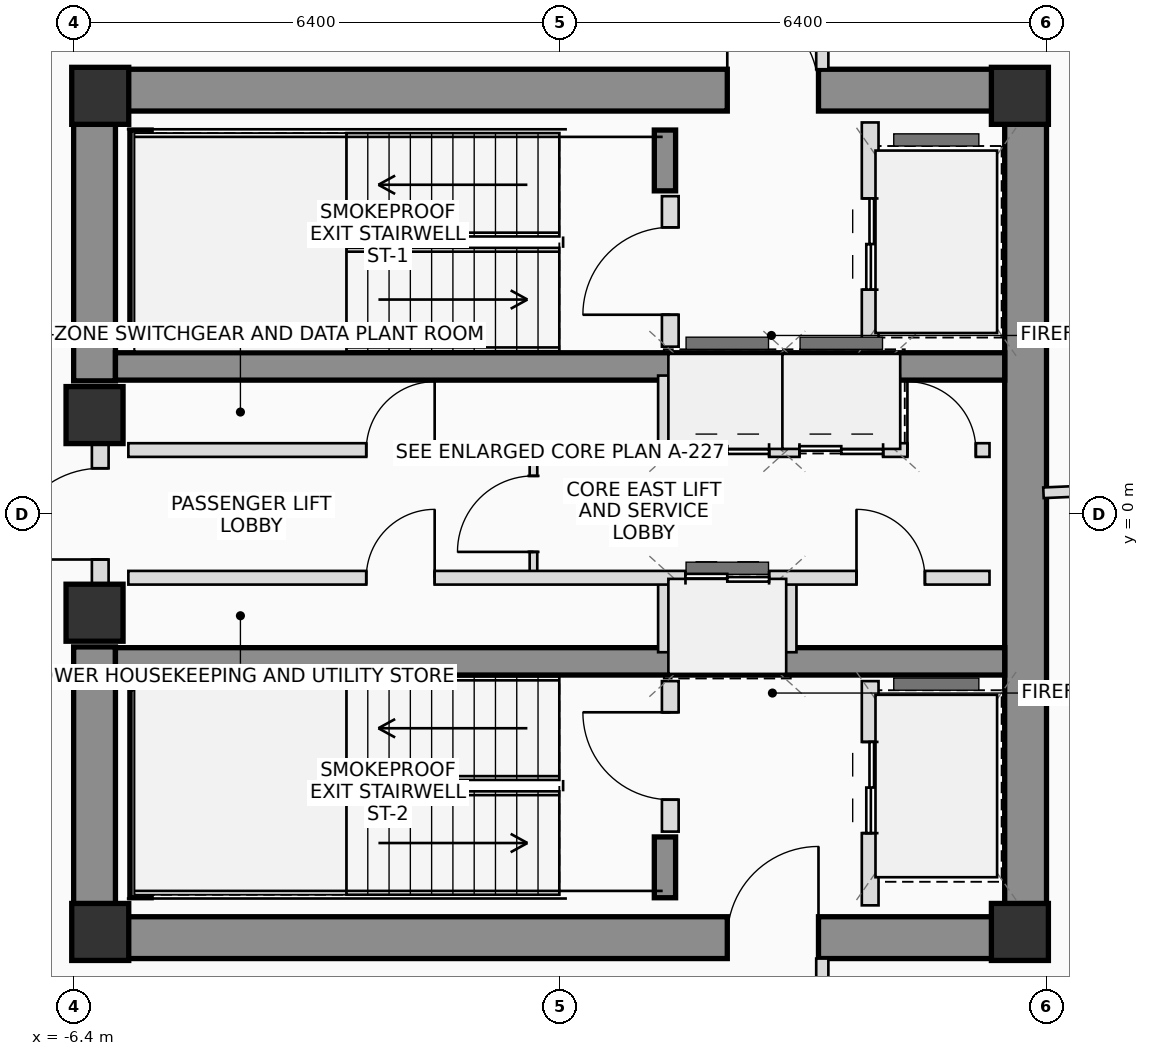
"""IFC4 building model, lengths in metres.
Left out: names, types, materials, properties, quantities, classifications, styles, units other than length and angle.
Written with IfcOpenShell. Run it as: python <this file> out.ifc"""

import sys

from ifc_helpers import new_model, si_unit, direction, frame, frame_2d, origin, origin_2d, place, context, subcontext, project, spatial, rectangle, extrude, source, transform, mapped, element, fill, save


model = new_model("IFC4")
c1 = context("Model", 3, precision=1e-05, world=origin(), true_north=direction((0.0, 1.0)))
c2 = subcontext(c1, "Body", "Model", "MODEL_VIEW")
j1 = project(units=[si_unit("LENGTHUNIT", "METRE"), si_unit("PLANEANGLEUNIT", "RADIAN")], contexts=[c1])
p1 = place(None, origin())
s1 = spatial("IfcSite", under=j1, at=p1, CompositionType="ELEMENT")
p2 = place(p1, origin())
s2 = spatial("IfcBuilding", under=s1, at=p2, CompositionType="ELEMENT")
p3 = place(p2, frame((0.0, 0.0, 307.1)))
s3 = spatial("IfcBuildingStorey", under=s2, at=p3, CompositionType="ELEMENT", Elevation=307.1)
m1 = source(origin(), c2, "Body", "SweptSolid", [
    extrude(rectangle(XDim=0.75, YDim=0.75, at=origin_2d()), origin(), (0.0, 0.0, 1.0), 3.45),
])
for number, where, z_axis, x_axis in (
    (1, (-6.05, -5.5, 0.0), (0.0, 0.0, 1.0), (1.0, 0.0, 0.0)),
    (2, (6.05, -5.5, 0.0), (0.0, 0.0, 1.0), (1.0, 0.0, 0.0)),
    (3, (6.05, 5.5, 0.0), (0.0, 0.0, 1.0), (1.0, 0.0, 0.0)),
    (4, (-6.05, 5.5, 0.0), (0.0, 0.0, 1.0), (1.0, 0.0, 0.0)),
):
    element("IfcColumn", number, at=place(p3, frame(where, z_axis=z_axis, x_axis=x_axis)), inside=s3, PredefinedType="COLUMN", context=c2, shape_type="MappedRepresentation", body=[
        mapped(m1, transform((0.0, 0.0, 0.0), scale=1.0)),
    ])
p4 = place(p3, frame((-6.4, 5.575, 0.0), z_axis=(0.0, 0.0, 1.0), x_axis=(1.0, 0.0, 0.0)))
e5 = element("IfcWall", 5, at=p4, inside=s3, PredefinedType="SHEAR", context=c2, shape_type="SweptSolid", body=[
    extrude(rectangle(XDim=12.8, YDim=0.55, at=frame_2d((6.4, 0.0))), origin(), (0.0, 0.0, 1.0), 3.45),
])
p5 = place(p4, frame((8.6, 0.0, 0.0)))
e6 = element("IfcOpeningElement", 6, at=p5, cuts=e5, PredefinedType="OPENING", context=c2, shape_type="SweptSolid", body=[
    extrude(rectangle(XDim=1.2, YDim=2.2, at=frame_2d((0.6, 1.1))), frame((0.0, 0.285, 0.0), z_axis=(0.0, -1.0, 0.0), x_axis=(1.0, 0.0, 0.0)), (0.0, 0.0, 1.0), 0.57),
])
p6 = place(p3, frame((-6.4, -5.575, 0.0), z_axis=(0.0, 0.0, 1.0), x_axis=(1.0, 0.0, 0.0)))
e7 = element("IfcWall", 7, at=p6, inside=s3, PredefinedType="SHEAR", context=c2, shape_type="SweptSolid", body=[
    extrude(rectangle(XDim=12.8, YDim=0.55, at=frame_2d((6.4, 0.0))), origin(), (0.0, 0.0, 1.0), 3.45),
])
p7 = place(p6, frame((8.6, 0.0, 0.0)))
e8 = element("IfcOpeningElement", 8, at=p7, cuts=e7, PredefinedType="OPENING", context=c2, shape_type="SweptSolid", body=[
    extrude(rectangle(XDim=1.2, YDim=2.2, at=frame_2d((0.6, 1.1))), frame((0.0, 0.285, 0.0), z_axis=(0.0, -1.0, 0.0), x_axis=(1.0, 0.0, 0.0)), (0.0, 0.0, 1.0), 0.57),
])
p8 = place(p3, frame((6.125, -5.3, 0.0), z_axis=(0.0, 0.0, 1.0), x_axis=(0.0, 1.0, 0.0)))
e9 = element("IfcWall", 9, at=p8, inside=s3, PredefinedType="SHEAR", context=c2, shape_type="SweptSolid", body=[
    extrude(rectangle(XDim=10.6, YDim=0.55, at=frame_2d((5.3, 0.0))), origin(), (0.0, 0.0, 1.0), 3.45),
])
for number, where, z_axis, x_axis in (
    (10, (-6.125, -5.3, 0.0), (0.0, 0.0, 1.0), (0.0, 1.0, 0.0)),
    (11, (-6.125, 1.75, 0.0), (0.0, 0.0, 1.0), (0.0, 1.0, 0.0)),
):
    element("IfcWall", number, at=place(p3, frame(where, z_axis=z_axis, x_axis=x_axis)), inside=s3, PredefinedType="SHEAR", context=c2, shape_type="SweptSolid", body=[
        extrude(rectangle(XDim=3.55, YDim=0.55, at=frame_2d((1.775, 0.0))), origin(), (0.0, 0.0, 1.0), 3.45),
    ])
for number, where, z_axis, x_axis in (
    (12, (-5.85, 1.94, 0.0), (0.0, 0.0, 1.0), (1.0, 0.0, 0.0)),
    (13, (-5.85, -1.94, 0.0), (0.0, 0.0, 1.0), (1.0, 0.0, 0.0)),
):
    element("IfcWall", number, at=place(p3, frame(where, z_axis=z_axis, x_axis=x_axis)), inside=s3, PredefinedType="SHEAR", context=c2, shape_type="SweptSolid", body=[
        extrude(rectangle(XDim=11.7, YDim=0.36, at=frame_2d((5.85, 0.0))), origin(), (0.0, 0.0, 1.0), 3.45),
    ])
p9 = place(p3, frame((-5.52, 2.3, 0.0), z_axis=(0.0, 0.0, 1.0), x_axis=(0.0, 1.0, 0.0)))
e14 = element("IfcWall", 14, at=p9, inside=s3, PredefinedType="SHEAR", context=c2, shape_type="SweptSolid", body=[
    extrude(rectangle(XDim=2.75, YDim=0.28, at=frame_2d((1.375, 0.0))), origin(), (0.0, 0.0, 1.0), 3.45),
])
p10 = place(p3, frame((1.38, 4.25, 0.0), z_axis=(0.0, 0.0, 1.0), x_axis=(0.0, 1.0, 0.0)))
e15 = element("IfcWall", 15, at=p10, inside=s3, PredefinedType="SHEAR", context=c2, shape_type="SweptSolid", body=[
    extrude(rectangle(XDim=0.8, YDim=0.28, at=frame_2d((0.4, 0.0))), origin(), (0.0, 0.0, 1.0), 3.45),
])
p11 = place(p3, frame((-5.52, -5.05, 0.0), z_axis=(0.0, 0.0, 1.0), x_axis=(0.0, 1.0, 0.0)))
e16 = element("IfcWall", 16, at=p11, inside=s3, PredefinedType="SHEAR", context=c2, shape_type="SweptSolid", body=[
    extrude(rectangle(XDim=2.75, YDim=0.28, at=frame_2d((1.375, 0.0))), origin(), (0.0, 0.0, 1.0), 3.45),
])
p12 = place(p3, frame((1.38, -5.05, 0.0), z_axis=(0.0, 0.0, 1.0), x_axis=(0.0, 1.0, 0.0)))
e17 = element("IfcWall", 17, at=p12, inside=s3, PredefinedType="SHEAR", context=c2, shape_type="SweptSolid", body=[
    extrude(rectangle(XDim=0.8, YDim=0.28, at=frame_2d((0.4, 0.0))), origin(), (0.0, 0.0, 1.0), 3.45),
])
for number, where, z_axis, x_axis in (
    (18, (-6.125, -1.3, 0.0), (0.0, 0.0, 1.0), (1.0, 0.0, 0.0)),
    (19, (-6.125, 1.3, 0.0), (0.0, 0.0, 1.0), (1.0, 0.0, 0.0)),
):
    element("IfcColumn", number, at=place(p3, frame(where, z_axis=z_axis, x_axis=x_axis)), inside=s3, PredefinedType="COLUMN", context=c2, shape_type="MappedRepresentation", body=[
        mapped(m1, transform((0.0, 0.0, 0.0), scale=1.0)),
    ])
p13 = place(p3, frame((-6.05, -0.95, 0.0), z_axis=(0.0, 0.0, 1.0), x_axis=(0.0, 1.0, 0.0)))
e20 = element("IfcWall", 20, at=p13, inside=s3, PredefinedType="PLUMBINGWALL", context=c2, shape_type="SweptSolid", body=[
    extrude(rectangle(XDim=1.9, YDim=0.22, at=frame_2d((0.95, 0.0))), origin(), (0.0, 0.0, 1.0), 2.23),
])
p14 = place(p13, frame((0.35, 0.0, 0.0)))
e21 = element("IfcOpeningElement", 21, at=p14, cuts=e20, PredefinedType="OPENING", context=c2, shape_type="SweptSolid", body=[
    extrude(rectangle(XDim=1.2, YDim=2.2, at=frame_2d((0.6, 1.1))), frame((0.0, 0.12, 0.0), z_axis=(0.0, -1.0, 0.0), x_axis=(1.0, 0.0, 0.0)), (0.0, 0.0, 1.0), 0.24),
])
p15 = place(p3, frame((1.45, 2.2, 0.0), z_axis=(0.0, 0.0, 1.0), x_axis=(0.0, 1.0, 0.0)))
e22 = element("IfcWall", 22, at=p15, inside=s3, PredefinedType="PLUMBINGWALL", context=c2, shape_type="SweptSolid", body=[
    extrude(rectangle(XDim=1.98, YDim=0.22, at=frame_2d((0.99, 0.0))), origin(), (0.0, 0.0, 1.0), 3.25),
])
p16 = place(p15, frame((0.42, 0.0, 0.0)))
e23 = element("IfcOpeningElement", 23, at=p16, cuts=e22, PredefinedType="OPENING", context=c2, shape_type="SweptSolid", body=[
    extrude(rectangle(XDim=1.15, YDim=2.15, at=frame_2d((0.575, 1.075))), frame((0.0, 0.12, 0.0), z_axis=(0.0, -1.0, 0.0), x_axis=(1.0, 0.0, 0.0)), (0.0, 0.0, 1.0), 0.24),
])
p17 = place(p3, frame((4.08, 2.2, 0.0), z_axis=(0.0, 0.0, 1.0), x_axis=(0.0, 1.0, 0.0)))
e24 = element("IfcWall", 24, at=p17, inside=s3, PredefinedType="PLUMBINGWALL", context=c2, shape_type="SweptSolid", body=[
    extrude(rectangle(XDim=2.95, YDim=0.22, at=frame_2d((1.475, 0.0))), origin(), (0.0, 0.0, 1.0), 3.25),
])
p18 = place(p17, frame((0.75, 0.0, 0.0)))
e25 = element("IfcOpeningElement", 25, at=p18, cuts=e24, PredefinedType="OPENING", context=c2, shape_type="SweptSolid", body=[
    extrude(rectangle(XDim=1.2, YDim=2.25, at=frame_2d((0.6, 1.125))), frame((0.0, 0.12, 0.0), z_axis=(0.0, -1.0, 0.0), x_axis=(1.0, 0.0, 0.0)), (0.0, 0.0, 1.0), 0.24),
])
p19 = place(p3, frame((1.45, -4.18, 0.0), z_axis=(0.0, 0.0, 1.0), x_axis=(0.0, 1.0, 0.0)))
e26 = element("IfcWall", 26, at=p19, inside=s3, PredefinedType="PLUMBINGWALL", context=c2, shape_type="SweptSolid", body=[
    extrude(rectangle(XDim=1.98, YDim=0.22, at=frame_2d((0.99, 0.0))), origin(), (0.0, 0.0, 1.0), 3.25),
])
p20 = place(p19, frame((0.42, 0.0, 0.0)))
e27 = element("IfcOpeningElement", 27, at=p20, cuts=e26, PredefinedType="OPENING", context=c2, shape_type="SweptSolid", body=[
    extrude(rectangle(XDim=1.15, YDim=2.15, at=frame_2d((0.575, 1.075))), frame((0.0, 0.12, 0.0), z_axis=(0.0, -1.0, 0.0), x_axis=(1.0, 0.0, 0.0)), (0.0, 0.0, 1.0), 0.24),
])
p21 = place(p3, frame((4.08, -5.15, 0.0), z_axis=(0.0, 0.0, 1.0), x_axis=(0.0, 1.0, 0.0)))
e28 = element("IfcWall", 28, at=p21, inside=s3, PredefinedType="PLUMBINGWALL", context=c2, shape_type="SweptSolid", body=[
    extrude(rectangle(XDim=2.95, YDim=0.22, at=frame_2d((1.475, 0.0))), origin(), (0.0, 0.0, 1.0), 3.25),
])
p22 = place(p21, frame((0.95, 0.0, 0.0)))
e29 = element("IfcOpeningElement", 29, at=p22, cuts=e28, PredefinedType="OPENING", context=c2, shape_type="SweptSolid", body=[
    extrude(rectangle(XDim=1.2, YDim=2.25, at=frame_2d((0.6, 1.125))), frame((0.0, 0.12, 0.0), z_axis=(0.0, -1.0, 0.0), x_axis=(1.0, 0.0, 0.0)), (0.0, 0.0, 1.0), 0.24),
])
p23 = place(p3, frame((-0.35, -0.84, 0.0), z_axis=(0.0, 0.0, 1.0), x_axis=(0.0, 1.0, 0.0)))
e30 = element("IfcWall", 30, at=p23, inside=s3, PredefinedType="PARTITIONING", context=c2, shape_type="SweptSolid", body=[
    extrude(rectangle(XDim=1.68, YDim=0.1, at=frame_2d((0.84, 0.0))), origin(), (0.0, 0.0, 1.0), 3.25),
])
p24 = place(p23, frame((0.34, 0.0, 0.0)))
e31 = element("IfcOpeningElement", 31, at=p24, cuts=e30, PredefinedType="OPENING", context=c2, shape_type="SweptSolid", body=[
    extrude(rectangle(XDim=1.0, YDim=2.25, at=frame_2d((0.5, 1.125))), frame((0.0, 0.06, 0.0), z_axis=(0.0, -1.0, 0.0), x_axis=(1.0, 0.0, 0.0)), (0.0, 0.0, 1.0), 0.12),
])
for number, where, z_axis, x_axis in (
    (32, (1.38, 0.84, 0.0), (0.0, 0.0, 1.0), (0.0, 1.0, 0.0)),
    (33, (1.38, -1.82, 0.0), (0.0, 0.0, 1.0), (0.0, 1.0, 0.0)),
    (34, (3.02, 0.84, 0.0), (0.0, 0.0, 1.0), (0.0, 1.0, 0.0)),
    (35, (4.38, 0.84, 0.0), (0.0, 0.0, 1.0), (0.0, 1.0, 0.0)),
    (36, (3.02, -1.82, 0.0), (0.0, 0.0, 1.0), (0.0, 1.0, 0.0)),
):
    element("IfcWall", number, at=place(p3, frame(where, z_axis=z_axis, x_axis=x_axis)), inside=s3, PredefinedType="PLUMBINGWALL", context=c2, shape_type="SweptSolid", body=[
        extrude(rectangle(XDim=0.98, YDim=0.18, at=frame_2d((0.49, 0.0))), origin(), (0.0, 0.0, 1.0), 3.25),
    ])
p25 = place(p3, frame((-5.68, 0.84, 0.0), z_axis=(0.0, 0.0, 1.0), x_axis=(1.0, 0.0, 0.0)))
e37 = element("IfcWall", 37, at=p25, inside=s3, PredefinedType="PLUMBINGWALL", context=c2, shape_type="SweptSolid", body=[
    extrude(rectangle(XDim=11.33, YDim=0.18, at=frame_2d((5.665, 0.0))), origin(), (0.0, 0.0, 1.0), 3.25),
])
p26 = place(p25, frame((3.13, 0.0, 0.0)))
e38 = element("IfcOpeningElement", 38, at=p26, cuts=e37, PredefinedType="OPENING", context=c2, shape_type="SweptSolid", body=[
    extrude(rectangle(XDim=0.9, YDim=2.05, at=frame_2d((0.45, 1.025))), frame((0.0, 0.1, 0.0), z_axis=(0.0, -1.0, 0.0), x_axis=(1.0, 0.0, 0.0)), (0.0, 0.0, 1.0), 0.2),
])
p27 = place(p25, frame((7.33, 0.0, 0.0)))
e39 = element("IfcOpeningElement", 39, at=p27, cuts=e37, PredefinedType="OPENING", context=c2, shape_type="SweptSolid", body=[
    extrude(rectangle(XDim=1.1, YDim=2.2, at=frame_2d((0.55, 1.1))), frame((0.0, 0.1, 0.0), z_axis=(0.0, -1.0, 0.0), x_axis=(1.0, 0.0, 0.0)), (0.0, 0.0, 1.0), 0.2),
])
p28 = place(p25, frame((8.83, 0.0, 0.0)))
e40 = element("IfcOpeningElement", 40, at=p28, cuts=e37, PredefinedType="OPENING", context=c2, shape_type="SweptSolid", body=[
    extrude(rectangle(XDim=1.1, YDim=2.2, at=frame_2d((0.55, 1.1))), frame((0.0, 0.1, 0.0), z_axis=(0.0, -1.0, 0.0), x_axis=(1.0, 0.0, 0.0)), (0.0, 0.0, 1.0), 0.2),
])
p29 = place(p25, frame((10.25, 0.0, 0.0)))
e41 = element("IfcOpeningElement", 41, at=p29, cuts=e37, PredefinedType="OPENING", context=c2, shape_type="SweptSolid", body=[
    extrude(rectangle(XDim=0.9, YDim=2.05, at=frame_2d((0.45, 1.025))), frame((0.0, 0.1, 0.0), z_axis=(0.0, -1.0, 0.0), x_axis=(1.0, 0.0, 0.0)), (0.0, 0.0, 1.0), 0.2),
])
p30 = place(p3, frame((-5.68, -0.84, 0.0), z_axis=(0.0, 0.0, 1.0), x_axis=(1.0, 0.0, 0.0)))
e42 = element("IfcWall", 42, at=p30, inside=s3, PredefinedType="PLUMBINGWALL", context=c2, shape_type="SweptSolid", body=[
    extrude(rectangle(XDim=11.33, YDim=0.18, at=frame_2d((5.665, 0.0))), origin(), (0.0, 0.0, 1.0), 3.25),
])
p31 = place(p30, frame((3.13, 0.0, 0.0)))
e43 = element("IfcOpeningElement", 43, at=p31, cuts=e42, PredefinedType="OPENING", context=c2, shape_type="SweptSolid", body=[
    extrude(rectangle(XDim=0.9, YDim=2.05, at=frame_2d((0.45, 1.025))), frame((0.0, 0.1, 0.0), z_axis=(0.0, -1.0, 0.0), x_axis=(1.0, 0.0, 0.0)), (0.0, 0.0, 1.0), 0.2),
])
p32 = place(p30, frame((7.33, 0.0, 0.0)))
e44 = element("IfcOpeningElement", 44, at=p32, cuts=e42, PredefinedType="OPENING", context=c2, shape_type="SweptSolid", body=[
    extrude(rectangle(XDim=1.1, YDim=2.2, at=frame_2d((0.55, 1.1))), frame((0.0, 0.1, 0.0), z_axis=(0.0, -1.0, 0.0), x_axis=(1.0, 0.0, 0.0)), (0.0, 0.0, 1.0), 0.2),
])
p33 = place(p30, frame((9.58, 0.0, 0.0)))
e45 = element("IfcOpeningElement", 45, at=p33, cuts=e42, PredefinedType="OPENING", context=c2, shape_type="SweptSolid", body=[
    extrude(rectangle(XDim=0.9, YDim=2.05, at=frame_2d((0.45, 1.025))), frame((0.0, 0.1, 0.0), z_axis=(0.0, -1.0, 0.0), x_axis=(1.0, 0.0, 0.0)), (0.0, 0.0, 1.0), 0.2),
])
p34 = place(p3, frame((3.45, 7.425, 0.0), z_axis=(0.0, 0.0, 1.0), x_axis=(0.0, -1.0, 0.0)))
e46 = element("IfcWall", 46, at=p34, inside=s3, PredefinedType="PARTITIONING", context=c2, shape_type="SweptSolid", body=[
    extrude(rectangle(XDim=1.575, YDim=0.16, at=frame_2d((0.787, 0.0))), origin(), (0.0, 0.0, 1.0), 2.855),
])
p35 = place(p34, frame((0.287, 0.0, 0.0)))
e47 = element("IfcOpeningElement", 47, at=p35, cuts=e46, PredefinedType="OPENING", context=c2, shape_type="SweptSolid", body=[
    extrude(rectangle(XDim=1.0, YDim=2.25, at=frame_2d((0.5, 1.125))), frame((0.0, 0.09, 0.0), z_axis=(0.0, -1.0, 0.0), x_axis=(1.0, 0.0, 0.0)), (0.0, 0.0, 1.0), 0.18),
])
p36 = place(p3, frame((3.45, -5.85, 0.0), z_axis=(0.0, 0.0, 1.0), x_axis=(0.0, -1.0, 0.0)))
e48 = element("IfcWall", 48, at=p36, inside=s3, PredefinedType="PARTITIONING", context=c2, shape_type="SweptSolid", body=[
    extrude(rectangle(XDim=1.575, YDim=0.16, at=frame_2d((0.787, 0.0))), origin(), (0.0, 0.0, 1.0), 2.855),
])
p37 = place(p36, frame((0.287, 0.0, 0.0)))
e49 = element("IfcOpeningElement", 49, at=p37, cuts=e48, PredefinedType="OPENING", context=c2, shape_type="SweptSolid", body=[
    extrude(rectangle(XDim=1.0, YDim=2.25, at=frame_2d((0.5, 1.125))), frame((0.0, 0.09, 0.0), z_axis=(0.0, -1.0, 0.0), x_axis=(1.0, 0.0, 0.0)), (0.0, 0.0, 1.0), 0.18),
])
p38 = place(p3, frame((6.36, 0.278, 0.0), z_axis=(0.0, 0.0, 1.0), x_axis=(0.999047623791, 0.043633076864, 0.0)))
e50 = element("IfcWall", 50, at=p38, inside=s3, PredefinedType="PARTITIONING", context=c2, shape_type="SweptSolid", body=[
    extrude(rectangle(XDim=13.524, YDim=0.14, at=frame_2d((6.762, 0.0))), origin(), (0.0, 0.0, 1.0), 2.815),
])
p39 = place(p5, origin())
e51 = element("IfcDoor", 51, at=p39, inside=s3, OperationType="SINGLE_SWING_LEFT", PredefinedType="DOOR", context=c2, shape_type="SweptSolid", body=[
    extrude(rectangle(XDim=1.2, YDim=2.2, at=frame_2d((0.6, 1.1))), frame((0.0, 0.025, 0.0), z_axis=(0.0, -1.0, 0.0), x_axis=(1.0, 0.0, 0.0)), (0.0, 0.0, 1.0), 0.05),
])
fill(e6, e51)
p40 = place(p7, origin())
e52 = element("IfcDoor", 52, at=p40, inside=s3, OperationType="SINGLE_SWING_RIGHT", PredefinedType="DOOR", context=c2, shape_type="SweptSolid", body=[
    extrude(rectangle(XDim=1.2, YDim=2.2, at=frame_2d((0.6, 1.1))), frame((0.0, 0.025, 0.0), z_axis=(0.0, -1.0, 0.0), x_axis=(1.0, 0.0, 0.0)), (0.0, 0.0, 1.0), 0.05),
])
fill(e8, e52)
p41 = place(p14, origin())
e53 = element("IfcDoor", 53, at=p41, inside=s3, OperationType="SINGLE_SWING_LEFT", PredefinedType="DOOR", context=c2, shape_type="SweptSolid", body=[
    extrude(rectangle(XDim=1.2, YDim=2.2, at=frame_2d((0.6, 1.1))), frame((0.0, 0.025, 0.0), z_axis=(0.0, -1.0, 0.0), x_axis=(1.0, 0.0, 0.0)), (0.0, 0.0, 1.0), 0.05),
])
fill(e21, e53)
p42 = place(p16, origin())
e54 = element("IfcDoor", 54, at=p42, inside=s3, OperationType="SINGLE_SWING_LEFT", PredefinedType="DOOR", context=c2, shape_type="SweptSolid", body=[
    extrude(rectangle(XDim=1.15, YDim=2.15, at=frame_2d((0.575, 1.075))), frame((0.0, 0.025, 0.0), z_axis=(0.0, -1.0, 0.0), x_axis=(1.0, 0.0, 0.0)), (0.0, 0.0, 1.0), 0.05),
])
fill(e23, e54)
p43 = place(p18, origin())
e55 = element("IfcDoor", 55, at=p43, inside=s3, OperationType="DOUBLE_DOOR_SLIDING", PredefinedType="DOOR", context=c2, shape_type="SweptSolid", body=[
    extrude(rectangle(XDim=1.2, YDim=2.25, at=frame_2d((0.6, 1.125))), frame((0.0, 0.025, 0.0), z_axis=(0.0, -1.0, 0.0), x_axis=(1.0, 0.0, 0.0)), (0.0, 0.0, 1.0), 0.05),
])
fill(e25, e55)
p44 = place(p20, origin())
e56 = element("IfcDoor", 56, at=p44, inside=s3, OperationType="SINGLE_SWING_RIGHT", PredefinedType="DOOR", context=c2, shape_type="SweptSolid", body=[
    extrude(rectangle(XDim=1.15, YDim=2.15, at=frame_2d((0.575, 1.075))), frame((0.0, 0.025, 0.0), z_axis=(0.0, -1.0, 0.0), x_axis=(1.0, 0.0, 0.0)), (0.0, 0.0, 1.0), 0.05),
])
fill(e27, e56)
p45 = place(p22, origin())
e57 = element("IfcDoor", 57, at=p45, inside=s3, OperationType="DOUBLE_DOOR_SLIDING", PredefinedType="DOOR", context=c2, shape_type="SweptSolid", body=[
    extrude(rectangle(XDim=1.2, YDim=2.25, at=frame_2d((0.6, 1.125))), frame((0.0, 0.025, 0.0), z_axis=(0.0, -1.0, 0.0), x_axis=(1.0, 0.0, 0.0)), (0.0, 0.0, 1.0), 0.05),
])
fill(e29, e57)
p46 = place(p24, origin())
e58 = element("IfcDoor", 58, at=p46, inside=s3, OperationType="SINGLE_SWING_LEFT", PredefinedType="DOOR", context=c2, shape_type="SweptSolid", body=[
    extrude(rectangle(XDim=1.0, YDim=2.25, at=frame_2d((0.5, 1.125))), frame((0.0, 0.025, 0.0), z_axis=(0.0, -1.0, 0.0), x_axis=(1.0, 0.0, 0.0)), (0.0, 0.0, 1.0), 0.05),
])
fill(e31, e58)
p47 = place(p26, origin())
e59 = element("IfcDoor", 59, at=p47, inside=s3, OperationType="SINGLE_SWING_RIGHT", PredefinedType="DOOR", context=c2, shape_type="SweptSolid", body=[
    extrude(rectangle(XDim=0.9, YDim=2.05, at=frame_2d((0.45, 1.025))), frame((0.0, 0.025, 0.0), z_axis=(0.0, -1.0, 0.0), x_axis=(1.0, 0.0, 0.0)), (0.0, 0.0, 1.0), 0.05),
])
fill(e38, e59)
p48 = place(p27, origin())
e60 = element("IfcDoor", 60, at=p48, inside=s3, OperationType="DOUBLE_DOOR_SLIDING", PredefinedType="DOOR", context=c2, shape_type="SweptSolid", body=[
    extrude(rectangle(XDim=1.1, YDim=2.2, at=frame_2d((0.55, 1.1))), frame((0.0, 0.025, 0.0), z_axis=(0.0, -1.0, 0.0), x_axis=(1.0, 0.0, 0.0)), (0.0, 0.0, 1.0), 0.05),
])
fill(e39, e60)
p49 = place(p28, origin())
e61 = element("IfcDoor", 61, at=p49, inside=s3, OperationType="DOUBLE_DOOR_SLIDING", PredefinedType="DOOR", context=c2, shape_type="SweptSolid", body=[
    extrude(rectangle(XDim=1.1, YDim=2.2, at=frame_2d((0.55, 1.1))), frame((0.0, 0.025, 0.0), z_axis=(0.0, -1.0, 0.0), x_axis=(1.0, 0.0, 0.0)), (0.0, 0.0, 1.0), 0.05),
])
fill(e40, e61)
p50 = place(p29, origin())
e62 = element("IfcDoor", 62, at=p50, inside=s3, OperationType="SINGLE_SWING_LEFT", PredefinedType="DOOR", context=c2, shape_type="SweptSolid", body=[
    extrude(rectangle(XDim=0.9, YDim=2.05, at=frame_2d((0.45, 1.025))), frame((0.0, 0.025, 0.0), z_axis=(0.0, -1.0, 0.0), x_axis=(1.0, 0.0, 0.0)), (0.0, 0.0, 1.0), 0.05),
])
fill(e41, e62)
p51 = place(p31, origin())
e63 = element("IfcDoor", 63, at=p51, inside=s3, OperationType="SINGLE_SWING_RIGHT", PredefinedType="DOOR", context=c2, shape_type="SweptSolid", body=[
    extrude(rectangle(XDim=0.9, YDim=2.05, at=frame_2d((0.45, 1.025))), frame((0.0, 0.025, 0.0), z_axis=(0.0, -1.0, 0.0), x_axis=(1.0, 0.0, 0.0)), (0.0, 0.0, 1.0), 0.05),
])
fill(e43, e63)
p52 = place(p32, origin())
e64 = element("IfcDoor", 64, at=p52, inside=s3, OperationType="DOUBLE_DOOR_SLIDING", PredefinedType="DOOR", context=c2, shape_type="SweptSolid", body=[
    extrude(rectangle(XDim=1.1, YDim=2.2, at=frame_2d((0.55, 1.1))), frame((0.0, 0.025, 0.0), z_axis=(0.0, -1.0, 0.0), x_axis=(1.0, 0.0, 0.0)), (0.0, 0.0, 1.0), 0.05),
])
fill(e44, e64)
p53 = place(p33, origin())
e65 = element("IfcDoor", 65, at=p53, inside=s3, OperationType="SINGLE_SWING_LEFT", PredefinedType="DOOR", context=c2, shape_type="SweptSolid", body=[
    extrude(rectangle(XDim=0.9, YDim=2.05, at=frame_2d((0.45, 1.025))), frame((0.0, 0.025, 0.0), z_axis=(0.0, -1.0, 0.0), x_axis=(1.0, 0.0, 0.0)), (0.0, 0.0, 1.0), 0.05),
])
fill(e45, e65)
save(model, sys.argv[1])
